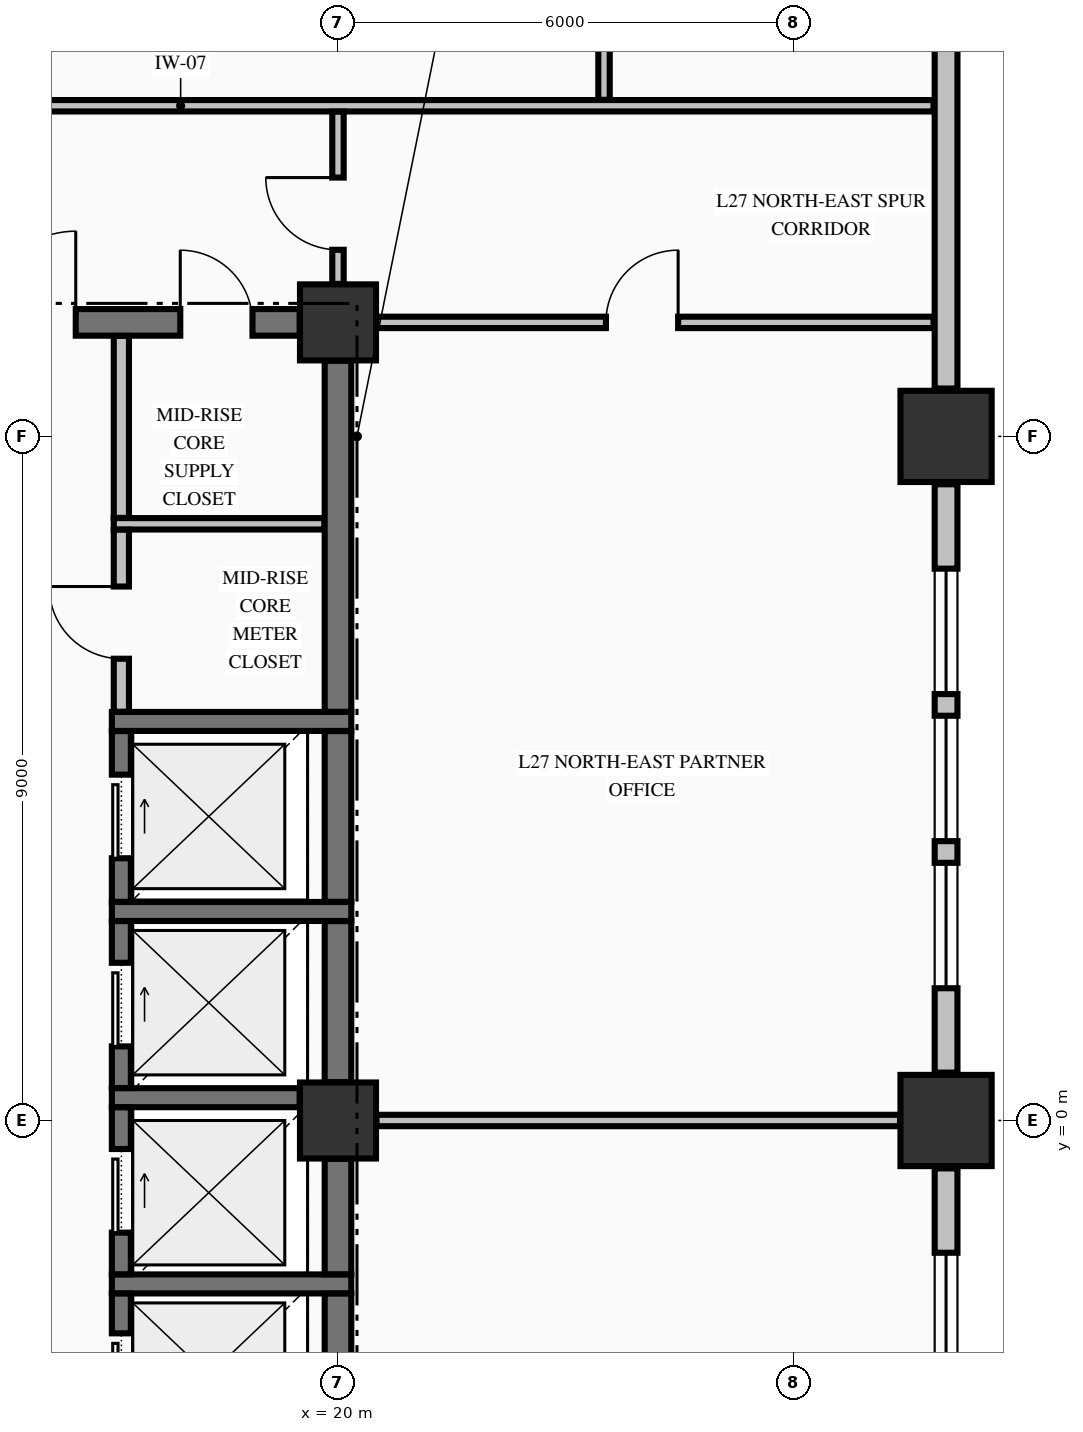
"""IFC4 building model, lengths in metres.
Left out: names, types, materials, properties, quantities, classifications, styles, units other than length and angle.
Written with IfcOpenShell. Run it as: python <this file> out.ifc"""

import sys

from ifc_helpers import new_model, si_unit, direction, frame, frame_2d, origin, origin_2d, place, context, subcontext, project, spatial, rectangle, extrude, element, fill, save


model = new_model("IFC4")
c1 = context("Model", 3, precision=1e-05, world=origin(), true_north=direction((0.0, 1.0)))
c2 = subcontext(c1, "Body", "Model", "MODEL_VIEW")
j1 = project(units=[si_unit("LENGTHUNIT", "METRE"), si_unit("PLANEANGLEUNIT", "RADIAN")], contexts=[c1])
p1 = place(None, origin())
s1 = spatial("IfcSite", under=j1, at=p1, CompositionType="ELEMENT")
p2 = place(p1, origin())
s2 = spatial("IfcBuilding", under=s1, at=p2, CompositionType="ELEMENT")
p3 = place(p2, frame((0.0, 0.0, 109.21)))
s3 = spatial("IfcBuildingStorey", under=s2, at=p3, CompositionType="ELEMENT", Elevation=109.21)
for number, where, z_axis, x_axis in (
    (1, (28.0, 0.0, -0.25), (0.0, 0.0, 1.0), (1.0, 0.0, 0.0)),
    (2, (28.0, 9.0, -0.25), (0.0, 0.0, 1.0), (1.0, 0.0, 0.0)),
):
    element("IfcColumn", number, at=place(p3, frame(where, z_axis=z_axis, x_axis=x_axis)), inside=s3, PredefinedType="COLUMN", context=c2, shape_type="SweptSolid", body=[
        extrude(rectangle(XDim=1.2, YDim=1.2, at=origin_2d()), origin(), (0.0, 0.0, 1.0), 3.57),
    ])
for number, where, z_axis, x_axis in (
    (3, (20.0, 10.5, -0.25), (0.0, 0.0, 1.0), (1.0, 0.0, 0.0)),
    (4, (20.0, 0.0, -0.25), (0.0, 0.0, 1.0), (1.0, 0.0, 0.0)),
):
    element("IfcColumn", number, at=place(p3, frame(where, z_axis=z_axis, x_axis=x_axis)), inside=s3, PredefinedType="COLUMN", context=c2, shape_type="SweptSolid", body=[
        extrude(rectangle(XDim=1.0, YDim=1.0, at=origin_2d()), origin(), (0.0, 0.0, 1.0), 3.57),
    ])
p4 = place(p3, frame((28.0, -8.37, 0.0), z_axis=(0.0, 0.0, 1.0), x_axis=(0.0, 1.0, 0.0)))
e5 = element("IfcWall", 5, at=p4, inside=s3, PredefinedType="STANDARD", context=c2, shape_type="SweptSolid", body=[
    extrude(rectangle(XDim=7.74, YDim=0.3, at=frame_2d((3.87, 0.0))), origin(), (0.0, 0.0, 1.0), 2.712),
])
p5 = place(p4, frame((1.11, 0.0, 0.8)))
e6 = element("IfcOpeningElement", 6, at=p5, cuts=e5, PredefinedType="OPENING", context=c2, shape_type="SweptSolid", body=[
    extrude(rectangle(XDim=1.65, YDim=1.7, at=frame_2d((0.825, 0.85))), frame((0.0, 0.16, 0.0), z_axis=(0.0, -1.0, 0.0), x_axis=(1.0, 0.0, 0.0)), (0.0, 0.0, 1.0), 0.32),
])
p6 = place(p4, frame((3.045, 0.0, 0.8)))
e7 = element("IfcOpeningElement", 7, at=p6, cuts=e5, PredefinedType="OPENING", context=c2, shape_type="SweptSolid", body=[
    extrude(rectangle(XDim=1.65, YDim=1.7, at=frame_2d((0.825, 0.85))), frame((0.0, 0.16, 0.0), z_axis=(0.0, -1.0, 0.0), x_axis=(1.0, 0.0, 0.0)), (0.0, 0.0, 1.0), 0.32),
])
p7 = place(p4, frame((4.98, 0.0, 0.8)))
e8 = element("IfcOpeningElement", 8, at=p7, cuts=e5, PredefinedType="OPENING", context=c2, shape_type="SweptSolid", body=[
    extrude(rectangle(XDim=1.65, YDim=1.7, at=frame_2d((0.825, 0.85))), frame((0.0, 0.16, 0.0), z_axis=(0.0, -1.0, 0.0), x_axis=(1.0, 0.0, 0.0)), (0.0, 0.0, 1.0), 0.32),
])
p8 = place(p3, frame((28.0, 0.63, 0.0), z_axis=(0.0, 0.0, 1.0), x_axis=(0.0, 1.0, 0.0)))
e9 = element("IfcWall", 9, at=p8, inside=s3, PredefinedType="STANDARD", context=c2, shape_type="SweptSolid", body=[
    extrude(rectangle(XDim=7.74, YDim=0.3, at=frame_2d((3.87, 0.0))), origin(), (0.0, 0.0, 1.0), 2.712),
])
p9 = place(p8, frame((1.11, 0.0, 0.8)))
e10 = element("IfcOpeningElement", 10, at=p9, cuts=e9, PredefinedType="OPENING", context=c2, shape_type="SweptSolid", body=[
    extrude(rectangle(XDim=1.65, YDim=1.7, at=frame_2d((0.825, 0.85))), frame((0.0, 0.16, 0.0), z_axis=(0.0, -1.0, 0.0), x_axis=(1.0, 0.0, 0.0)), (0.0, 0.0, 1.0), 0.32),
])
p10 = place(p8, frame((3.045, 0.0, 0.8)))
e11 = element("IfcOpeningElement", 11, at=p10, cuts=e9, PredefinedType="OPENING", context=c2, shape_type="SweptSolid", body=[
    extrude(rectangle(XDim=1.65, YDim=1.7, at=frame_2d((0.825, 0.85))), frame((0.0, 0.16, 0.0), z_axis=(0.0, -1.0, 0.0), x_axis=(1.0, 0.0, 0.0)), (0.0, 0.0, 1.0), 0.32),
])
p11 = place(p8, frame((4.98, 0.0, 0.8)))
e12 = element("IfcOpeningElement", 12, at=p11, cuts=e9, PredefinedType="OPENING", context=c2, shape_type="SweptSolid", body=[
    extrude(rectangle(XDim=1.65, YDim=1.7, at=frame_2d((0.825, 0.85))), frame((0.0, 0.16, 0.0), z_axis=(0.0, -1.0, 0.0), x_axis=(1.0, 0.0, 0.0)), (0.0, 0.0, 1.0), 0.32),
])
p12 = place(p3, frame((28.0, 9.63, 0.0), z_axis=(0.0, 0.0, 1.0), x_axis=(0.0, 1.0, 0.0)))
e13 = element("IfcWall", 13, at=p12, inside=s3, PredefinedType="STANDARD", context=c2, shape_type="SweptSolid", body=[
    extrude(rectangle(XDim=10.74, YDim=0.3, at=frame_2d((5.37, 0.0))), origin(), (0.0, 0.0, 1.0), 2.712),
])
p13 = place(p3, frame((17.025, -2.15, 0.0), z_axis=(0.0, 0.0, 1.0), x_axis=(1.0, 0.0, 0.0)))
e14 = element("IfcWall", 14, at=p13, inside=s3, PredefinedType="SOLIDWALL", context=c2, shape_type="SweptSolid", body=[
    extrude(rectangle(XDim=3.15, YDim=0.25, at=frame_2d((1.575, 0.0))), origin(), (0.0, 0.0, 1.0), 3.32),
])
p14 = place(p3, frame((17.025, 0.3, 0.0), z_axis=(0.0, 0.0, 1.0), x_axis=(1.0, 0.0, 0.0)))
e15 = element("IfcWall", 15, at=p14, inside=s3, PredefinedType="SOLIDWALL", context=c2, shape_type="SweptSolid", body=[
    extrude(rectangle(XDim=2.471, YDim=0.25, at=frame_2d((1.236, 0.0))), origin(), (0.0, 0.0, 1.0), 3.32),
])
for number, where, z_axis, x_axis in (
    (16, (17.025, 2.75, 0.0), (0.0, 0.0, 1.0), (1.0, 0.0, 0.0)),
    (17, (17.025, 5.25, 0.0), (0.0, 0.0, 1.0), (1.0, 0.0, 0.0)),
):
    element("IfcWall", number, at=place(p3, frame(where, z_axis=z_axis, x_axis=x_axis)), inside=s3, PredefinedType="SOLIDWALL", context=c2, shape_type="SweptSolid", body=[
        extrude(rectangle(XDim=3.15, YDim=0.25, at=frame_2d((1.575, 0.0))), origin(), (0.0, 0.0, 1.0), 3.32),
    ])
p15 = place(p3, frame((14.7, 10.5, 0.0), z_axis=(0.0, 0.0, 1.0), x_axis=(1.0, 0.0, 0.0)))
e18 = element("IfcWall", 18, at=p15, inside=s3, PredefinedType="SHEAR", context=c2, shape_type="SweptSolid", body=[
    extrude(rectangle(XDim=4.796, YDim=0.35, at=frame_2d((2.398, 0.0))), origin(), (0.0, 0.0, 1.0), 3.32),
])
p16 = place(p15, frame((0.65, 0.0, 0.0)))
e19 = element("IfcOpeningElement", 19, at=p16, cuts=e18, PredefinedType="OPENING", context=c2, shape_type="SweptSolid", body=[
    extrude(rectangle(XDim=1.2, YDim=2.15, at=frame_2d((0.6, 1.075))), frame((0.0, 0.185, 0.0), z_axis=(0.0, -1.0, 0.0), x_axis=(1.0, 0.0, 0.0)), (0.0, 0.0, 1.0), 0.37),
])
p17 = place(p15, frame((3.225, 0.0, 0.0)))
e20 = element("IfcOpeningElement", 20, at=p17, cuts=e18, PredefinedType="OPENING", context=c2, shape_type="SweptSolid", body=[
    extrude(rectangle(XDim=0.95, YDim=2.15, at=frame_2d((0.475, 1.075))), frame((0.0, 0.185, 0.0), z_axis=(0.0, -1.0, 0.0), x_axis=(1.0, 0.0, 0.0)), (0.0, 0.0, 1.0), 0.37),
])
p18 = place(p3, frame((20.506, 0.0, 0.0), z_axis=(0.0, 0.0, 1.0), x_axis=(1.0, 0.0, 0.0)))
e21 = element("IfcWall", 21, at=p18, inside=s3, PredefinedType="PARTITIONING", context=c2, shape_type="SweptSolid", body=[
    extrude(rectangle(XDim=6.888, YDim=0.15, at=frame_2d((3.444, 0.0))), origin(), (0.0, 0.0, 1.0), 2.81),
])
p19 = place(p3, frame((17.05, 7.85, 0.0), z_axis=(0.0, 0.0, 1.0), x_axis=(1.0, 0.0, 0.0)))
e22 = element("IfcWall", 22, at=p19, inside=s3, PredefinedType="PARTITIONING", context=c2, shape_type="SweptSolid", body=[
    extrude(rectangle(XDim=2.772, YDim=0.15, at=frame_2d((1.386, 0.0))), origin(), (0.0, 0.0, 1.0), 3.32),
])
p20 = place(p3, frame((20.506, 10.5, 0.0), z_axis=(0.0, 0.0, 1.0), x_axis=(1.0, 0.0, 0.0)))
e23 = element("IfcWall", 23, at=p20, inside=s3, PredefinedType="PARTITIONING", context=c2, shape_type="SweptSolid", body=[
    extrude(rectangle(XDim=7.329, YDim=0.15, at=frame_2d((3.665, 0.0))), origin(), (0.0, 0.0, 1.0), 3.32),
])
p21 = place(p20, frame((3.019, 0.0, 0.0)))
e24 = element("IfcOpeningElement", 24, at=p21, cuts=e23, PredefinedType="OPENING", context=c2, shape_type="SweptSolid", body=[
    extrude(rectangle(XDim=0.95, YDim=2.15, at=frame_2d((0.475, 1.075))), frame((0.0, 0.085, 0.0), z_axis=(0.0, -1.0, 0.0), x_axis=(1.0, 0.0, 0.0)), (0.0, 0.0, 1.0), 0.17),
])
p22 = place(p3, frame((-22.835, 13.35, 0.0), z_axis=(0.0, 0.0, 1.0), x_axis=(1.0, 0.0, 0.0)))
e25 = element("IfcWall", 25, at=p22, inside=s3, PredefinedType="PARTITIONING", context=c2, shape_type="SweptSolid", body=[
    extrude(rectangle(XDim=50.67, YDim=0.15, at=frame_2d((25.335, 0.0))), origin(), (0.0, 0.0, 1.0), 3.32),
])
p23 = place(p22, frame((15.86, 0.0, 0.0)))
e26 = element("IfcOpeningElement", 26, at=p23, cuts=e25, PredefinedType="OPENING", context=c2, shape_type="SweptSolid", body=[
    extrude(rectangle(XDim=1.05, YDim=2.15, at=frame_2d((0.525, 1.075))), frame((0.0, 0.085, 0.0), z_axis=(0.0, -1.0, 0.0), x_axis=(1.0, 0.0, 0.0)), (0.0, 0.0, 1.0), 0.17),
])
p24 = place(p22, frame((29.81, 0.0, 0.0)))
e27 = element("IfcOpeningElement", 27, at=p24, cuts=e25, PredefinedType="OPENING", context=c2, shape_type="SweptSolid", body=[
    extrude(rectangle(XDim=1.05, YDim=2.15, at=frame_2d((0.525, 1.075))), frame((0.0, 0.085, 0.0), z_axis=(0.0, -1.0, 0.0), x_axis=(1.0, 0.0, 0.0)), (0.0, 0.0, 1.0), 0.17),
])
p25 = place(p3, frame((17.15, -4.423, 0.0), z_axis=(0.0, 0.0, 1.0), x_axis=(0.0, 1.0, 0.0)))
e28 = element("IfcWall", 28, at=p25, inside=s3, PredefinedType="SOLIDWALL", context=c2, shape_type="SweptSolid", body=[
    extrude(rectangle(XDim=2.146, YDim=0.25, at=frame_2d((1.073, 0.0))), origin(), (0.0, 0.0, 1.0), 3.32),
])
p26 = place(p25, frame((0.523, 0.0, 0.0)))
e29 = element("IfcOpeningElement", 29, at=p26, cuts=e28, PredefinedType="OPENING", context=c2, shape_type="SweptSolid", body=[
    extrude(rectangle(XDim=1.1, YDim=2.2, at=frame_2d((0.55, 1.1))), frame((0.0, 0.135, 0.0), z_axis=(0.0, -1.0, 0.0), x_axis=(1.0, 0.0, 0.0)), (0.0, 0.0, 1.0), 0.27),
])
p27 = place(p3, frame((17.15, -2.023, 0.0), z_axis=(0.0, 0.0, 1.0), x_axis=(0.0, 1.0, 0.0)))
e30 = element("IfcWall", 30, at=p27, inside=s3, PredefinedType="SOLIDWALL", context=c2, shape_type="SweptSolid", body=[
    extrude(rectangle(XDim=2.196, YDim=0.25, at=frame_2d((1.098, 0.0))), origin(), (0.0, 0.0, 1.0), 3.32),
])
p28 = place(p27, frame((0.548, 0.0, 0.0)))
e31 = element("IfcOpeningElement", 31, at=p28, cuts=e30, PredefinedType="OPENING", context=c2, shape_type="SweptSolid", body=[
    extrude(rectangle(XDim=1.1, YDim=2.2, at=frame_2d((0.55, 1.1))), frame((0.0, 0.135, 0.0), z_axis=(0.0, -1.0, 0.0), x_axis=(1.0, 0.0, 0.0)), (0.0, 0.0, 1.0), 0.27),
])
p29 = place(p3, frame((17.15, 0.427, 0.0), z_axis=(0.0, 0.0, 1.0), x_axis=(0.0, 1.0, 0.0)))
e32 = element("IfcWall", 32, at=p29, inside=s3, PredefinedType="SOLIDWALL", context=c2, shape_type="SweptSolid", body=[
    extrude(rectangle(XDim=2.196, YDim=0.25, at=frame_2d((1.098, 0.0))), origin(), (0.0, 0.0, 1.0), 3.32),
])
p30 = place(p29, frame((0.548, 0.0, 0.0)))
e33 = element("IfcOpeningElement", 33, at=p30, cuts=e32, PredefinedType="OPENING", context=c2, shape_type="SweptSolid", body=[
    extrude(rectangle(XDim=1.1, YDim=2.2, at=frame_2d((0.55, 1.1))), frame((0.0, 0.135, 0.0), z_axis=(0.0, -1.0, 0.0), x_axis=(1.0, 0.0, 0.0)), (0.0, 0.0, 1.0), 0.27),
])
p31 = place(p3, frame((17.15, 2.877, 0.0), z_axis=(0.0, 0.0, 1.0), x_axis=(0.0, 1.0, 0.0)))
e34 = element("IfcWall", 34, at=p31, inside=s3, PredefinedType="SOLIDWALL", context=c2, shape_type="SweptSolid", body=[
    extrude(rectangle(XDim=2.246, YDim=0.25, at=frame_2d((1.123, 0.0))), origin(), (0.0, 0.0, 1.0), 3.32),
])
p32 = place(p31, frame((0.573, 0.0, 0.0)))
e35 = element("IfcOpeningElement", 35, at=p32, cuts=e34, PredefinedType="OPENING", context=c2, shape_type="SweptSolid", body=[
    extrude(rectangle(XDim=1.1, YDim=2.2, at=frame_2d((0.55, 1.1))), frame((0.0, 0.135, 0.0), z_axis=(0.0, -1.0, 0.0), x_axis=(1.0, 0.0, 0.0)), (0.0, 0.0, 1.0), 0.27),
])
p33 = place(p3, frame((20.0, -4.423, 0.0), z_axis=(0.0, 0.0, 1.0), x_axis=(0.0, 1.0, 0.0)))
e36 = element("IfcWall", 36, at=p33, inside=s3, PredefinedType="SHEAR", context=c2, shape_type="SweptSolid", body=[
    extrude(rectangle(XDim=2.146, YDim=0.35, at=frame_2d((1.073, 0.0))), origin(), (0.0, 0.0, 1.0), 3.32),
])
p34 = place(p3, frame((20.0, -2.023, 0.0), z_axis=(0.0, 0.0, 1.0), x_axis=(0.0, 1.0, 0.0)))
e37 = element("IfcWall", 37, at=p34, inside=s3, PredefinedType="SHEAR", context=c2, shape_type="SweptSolid", body=[
    extrude(rectangle(XDim=1.519, YDim=0.35, at=frame_2d((0.76, 0.0))), origin(), (0.0, 0.0, 1.0), 3.32),
])
p35 = place(p3, frame((20.0, 0.504, 0.0), z_axis=(0.0, 0.0, 1.0), x_axis=(0.0, 1.0, 0.0)))
e38 = element("IfcWall", 38, at=p35, inside=s3, PredefinedType="SHEAR", context=c2, shape_type="SweptSolid", body=[
    extrude(rectangle(XDim=2.119, YDim=0.35, at=frame_2d((1.06, 0.0))), origin(), (0.0, 0.0, 1.0), 3.32),
])
p36 = place(p3, frame((20.0, 2.877, 0.0), z_axis=(0.0, 0.0, 1.0), x_axis=(0.0, 1.0, 0.0)))
e39 = element("IfcWall", 39, at=p36, inside=s3, PredefinedType="SHEAR", context=c2, shape_type="SweptSolid", body=[
    extrude(rectangle(XDim=2.246, YDim=0.35, at=frame_2d((1.123, 0.0))), origin(), (0.0, 0.0, 1.0), 3.32),
])
p37 = place(p3, frame((20.0, 5.377, 0.0), z_axis=(0.0, 0.0, 1.0), x_axis=(0.0, 1.0, 0.0)))
e40 = element("IfcWall", 40, at=p37, inside=s3, PredefinedType="SHEAR", context=c2, shape_type="SweptSolid", body=[
    extrude(rectangle(XDim=4.619, YDim=0.35, at=frame_2d((2.31, 0.0))), origin(), (0.0, 0.0, 1.0), 3.32),
])
p38 = place(p3, frame((17.15, 5.378, 0.0), z_axis=(0.0, 0.0, 1.0), x_axis=(0.0, 1.0, 0.0)))
e41 = element("IfcWall", 41, at=p38, inside=s3, PredefinedType="PARTITIONING", context=c2, shape_type="SweptSolid", body=[
    extrude(rectangle(XDim=2.394, YDim=0.2, at=frame_2d((1.197, 0.0))), origin(), (0.0, 0.0, 1.0), 3.32),
])
p39 = place(p38, frame((0.697, 0.0, 0.0)))
e42 = element("IfcOpeningElement", 42, at=p39, cuts=e41, PredefinedType="OPENING", context=c2, shape_type="SweptSolid", body=[
    extrude(rectangle(XDim=0.95, YDim=2.15, at=frame_2d((0.475, 1.075))), frame((0.0, 0.11, 0.0), z_axis=(0.0, -1.0, 0.0), x_axis=(1.0, 0.0, 0.0)), (0.0, 0.0, 1.0), 0.22),
])
p40 = place(p3, frame((17.15, 7.928, 0.0), z_axis=(0.0, 0.0, 1.0), x_axis=(0.0, 1.0, 0.0)))
e43 = element("IfcWall", 43, at=p40, inside=s3, PredefinedType="PARTITIONING", context=c2, shape_type="SweptSolid", body=[
    extrude(rectangle(XDim=2.394, YDim=0.2, at=frame_2d((1.197, 0.0))), origin(), (0.0, 0.0, 1.0), 3.32),
])
p41 = place(p3, frame((20.0, 11.006, 0.0), z_axis=(0.0, 0.0, 1.0), x_axis=(0.0, 1.0, 0.0)))
e44 = element("IfcWall", 44, at=p41, inside=s3, PredefinedType="PARTITIONING", context=c2, shape_type="SweptSolid", body=[
    extrude(rectangle(XDim=2.266, YDim=0.15, at=frame_2d((1.133, 0.0))), origin(), (0.0, 0.0, 1.0), 2.81),
])
p42 = place(p41, frame((0.449, 0.0, 0.0)))
e45 = element("IfcOpeningElement", 45, at=p42, cuts=e44, PredefinedType="OPENING", context=c2, shape_type="SweptSolid", body=[
    extrude(rectangle(XDim=0.95, YDim=2.15, at=frame_2d((0.475, 1.075))), frame((0.0, 0.085, 0.0), z_axis=(0.0, -1.0, 0.0), x_axis=(1.0, 0.0, 0.0)), (0.0, 0.0, 1.0), 0.17),
])
p43 = place(p3, frame((23.5, 13.428, 0.0), z_axis=(0.0, 0.0, 1.0), x_axis=(0.0, 1.0, 0.0)))
e46 = element("IfcWall", 46, at=p43, inside=s3, PredefinedType="PARTITIONING", context=c2, shape_type="SweptSolid", body=[
    extrude(rectangle(XDim=6.966, YDim=0.15, at=frame_2d((3.483, 0.0))), origin(), (0.0, 0.0, 1.0), 3.32),
])
p44 = place(p7, origin())
e47 = element("IfcWindow", 47, at=p44, inside=s3, PartitioningType="SINGLE_PANEL", PredefinedType="WINDOW", context=c2, shape_type="SweptSolid", body=[
    extrude(rectangle(XDim=1.65, YDim=1.7, at=frame_2d((0.825, 0.85))), frame((0.0, 0.03, 0.0), z_axis=(0.0, -1.0, 0.0), x_axis=(1.0, 0.0, 0.0)), (0.0, 0.0, 1.0), 0.06),
])
fill(e8, e47)
p45 = place(p9, origin())
e48 = element("IfcWindow", 48, at=p45, inside=s3, PartitioningType="SINGLE_PANEL", PredefinedType="WINDOW", context=c2, shape_type="SweptSolid", body=[
    extrude(rectangle(XDim=1.65, YDim=1.7, at=frame_2d((0.825, 0.85))), frame((0.0, 0.03, 0.0), z_axis=(0.0, -1.0, 0.0), x_axis=(1.0, 0.0, 0.0)), (0.0, 0.0, 1.0), 0.06),
])
fill(e10, e48)
p46 = place(p10, origin())
e49 = element("IfcWindow", 49, at=p46, inside=s3, PartitioningType="SINGLE_PANEL", PredefinedType="WINDOW", context=c2, shape_type="SweptSolid", body=[
    extrude(rectangle(XDim=1.65, YDim=1.7, at=frame_2d((0.825, 0.85))), frame((0.0, 0.03, 0.0), z_axis=(0.0, -1.0, 0.0), x_axis=(1.0, 0.0, 0.0)), (0.0, 0.0, 1.0), 0.06),
])
fill(e11, e49)
p47 = place(p11, origin())
e50 = element("IfcWindow", 50, at=p47, inside=s3, PartitioningType="SINGLE_PANEL", PredefinedType="WINDOW", context=c2, shape_type="SweptSolid", body=[
    extrude(rectangle(XDim=1.65, YDim=1.7, at=frame_2d((0.825, 0.85))), frame((0.0, 0.03, 0.0), z_axis=(0.0, -1.0, 0.0), x_axis=(1.0, 0.0, 0.0)), (0.0, 0.0, 1.0), 0.06),
])
fill(e12, e50)
p48 = place(p26, origin())
e51 = element("IfcDoor", 51, at=p48, inside=s3, OperationType="SLIDING_TO_RIGHT", PredefinedType="DOOR", context=c2, shape_type="SweptSolid", body=[
    extrude(rectangle(XDim=1.1, YDim=2.2, at=frame_2d((0.55, 1.1))), frame((0.0, 0.025, 0.0), z_axis=(0.0, -1.0, 0.0), x_axis=(1.0, 0.0, 0.0)), (0.0, 0.0, 1.0), 0.05),
])
fill(e29, e51)
p49 = place(p28, origin())
e52 = element("IfcDoor", 52, at=p49, inside=s3, OperationType="SLIDING_TO_RIGHT", PredefinedType="DOOR", context=c2, shape_type="SweptSolid", body=[
    extrude(rectangle(XDim=1.1, YDim=2.2, at=frame_2d((0.55, 1.1))), frame((0.0, 0.025, 0.0), z_axis=(0.0, -1.0, 0.0), x_axis=(1.0, 0.0, 0.0)), (0.0, 0.0, 1.0), 0.05),
])
fill(e31, e52)
p50 = place(p30, origin())
e53 = element("IfcDoor", 53, at=p50, inside=s3, OperationType="SLIDING_TO_RIGHT", PredefinedType="DOOR", context=c2, shape_type="SweptSolid", body=[
    extrude(rectangle(XDim=1.1, YDim=2.2, at=frame_2d((0.55, 1.1))), frame((0.0, 0.025, 0.0), z_axis=(0.0, -1.0, 0.0), x_axis=(1.0, 0.0, 0.0)), (0.0, 0.0, 1.0), 0.05),
])
fill(e33, e53)
p51 = place(p32, origin())
e54 = element("IfcDoor", 54, at=p51, inside=s3, OperationType="SLIDING_TO_RIGHT", PredefinedType="DOOR", context=c2, shape_type="SweptSolid", body=[
    extrude(rectangle(XDim=1.1, YDim=2.2, at=frame_2d((0.55, 1.1))), frame((0.0, 0.025, 0.0), z_axis=(0.0, -1.0, 0.0), x_axis=(1.0, 0.0, 0.0)), (0.0, 0.0, 1.0), 0.05),
])
fill(e35, e54)
p52 = place(p16, origin())
e55 = element("IfcDoor", 55, at=p52, inside=s3, OperationType="SINGLE_SWING_RIGHT", PredefinedType="DOOR", context=c2, shape_type="SweptSolid", body=[
    extrude(rectangle(XDim=1.2, YDim=2.15, at=frame_2d((0.6, 1.075))), frame((0.0, 0.025, 0.0), z_axis=(0.0, -1.0, 0.0), x_axis=(1.0, 0.0, 0.0)), (0.0, 0.0, 1.0), 0.05),
])
fill(e19, e55)
p53 = place(p17, origin())
e56 = element("IfcDoor", 56, at=p53, inside=s3, OperationType="SINGLE_SWING_LEFT", PredefinedType="DOOR", context=c2, shape_type="SweptSolid", body=[
    extrude(rectangle(XDim=0.95, YDim=2.15, at=frame_2d((0.475, 1.075))), frame((0.0, 0.025, 0.0), z_axis=(0.0, -1.0, 0.0), x_axis=(1.0, 0.0, 0.0)), (0.0, 0.0, 1.0), 0.05),
])
fill(e20, e56)
p54 = place(p39, origin())
e57 = element("IfcDoor", 57, at=p54, inside=s3, OperationType="SINGLE_SWING_RIGHT", PredefinedType="DOOR", context=c2, shape_type="SweptSolid", body=[
    extrude(rectangle(XDim=0.95, YDim=2.15, at=frame_2d((0.475, 1.075))), frame((0.0, 0.025, 0.0), z_axis=(0.0, -1.0, 0.0), x_axis=(1.0, 0.0, 0.0)), (0.0, 0.0, 1.0), 0.05),
])
fill(e42, e57)
p55 = place(p42, origin())
e58 = element("IfcDoor", 58, at=p55, inside=s3, OperationType="SINGLE_SWING_RIGHT", PredefinedType="DOOR", context=c2, shape_type="SweptSolid", body=[
    extrude(rectangle(XDim=0.95, YDim=2.15, at=frame_2d((0.475, 1.075))), frame((0.0, 0.025, 0.0), z_axis=(0.0, -1.0, 0.0), x_axis=(1.0, 0.0, 0.0)), (0.0, 0.0, 1.0), 0.05),
])
fill(e45, e58)
p56 = place(p21, origin())
e59 = element("IfcDoor", 59, at=p56, inside=s3, OperationType="SINGLE_SWING_RIGHT", PredefinedType="DOOR", context=c2, shape_type="SweptSolid", body=[
    extrude(rectangle(XDim=0.95, YDim=2.15, at=frame_2d((0.475, 1.075))), frame((0.0, 0.025, 0.0), z_axis=(0.0, -1.0, 0.0), x_axis=(1.0, 0.0, 0.0)), (0.0, 0.0, 1.0), 0.05),
])
fill(e24, e59)
save(model, sys.argv[1])
